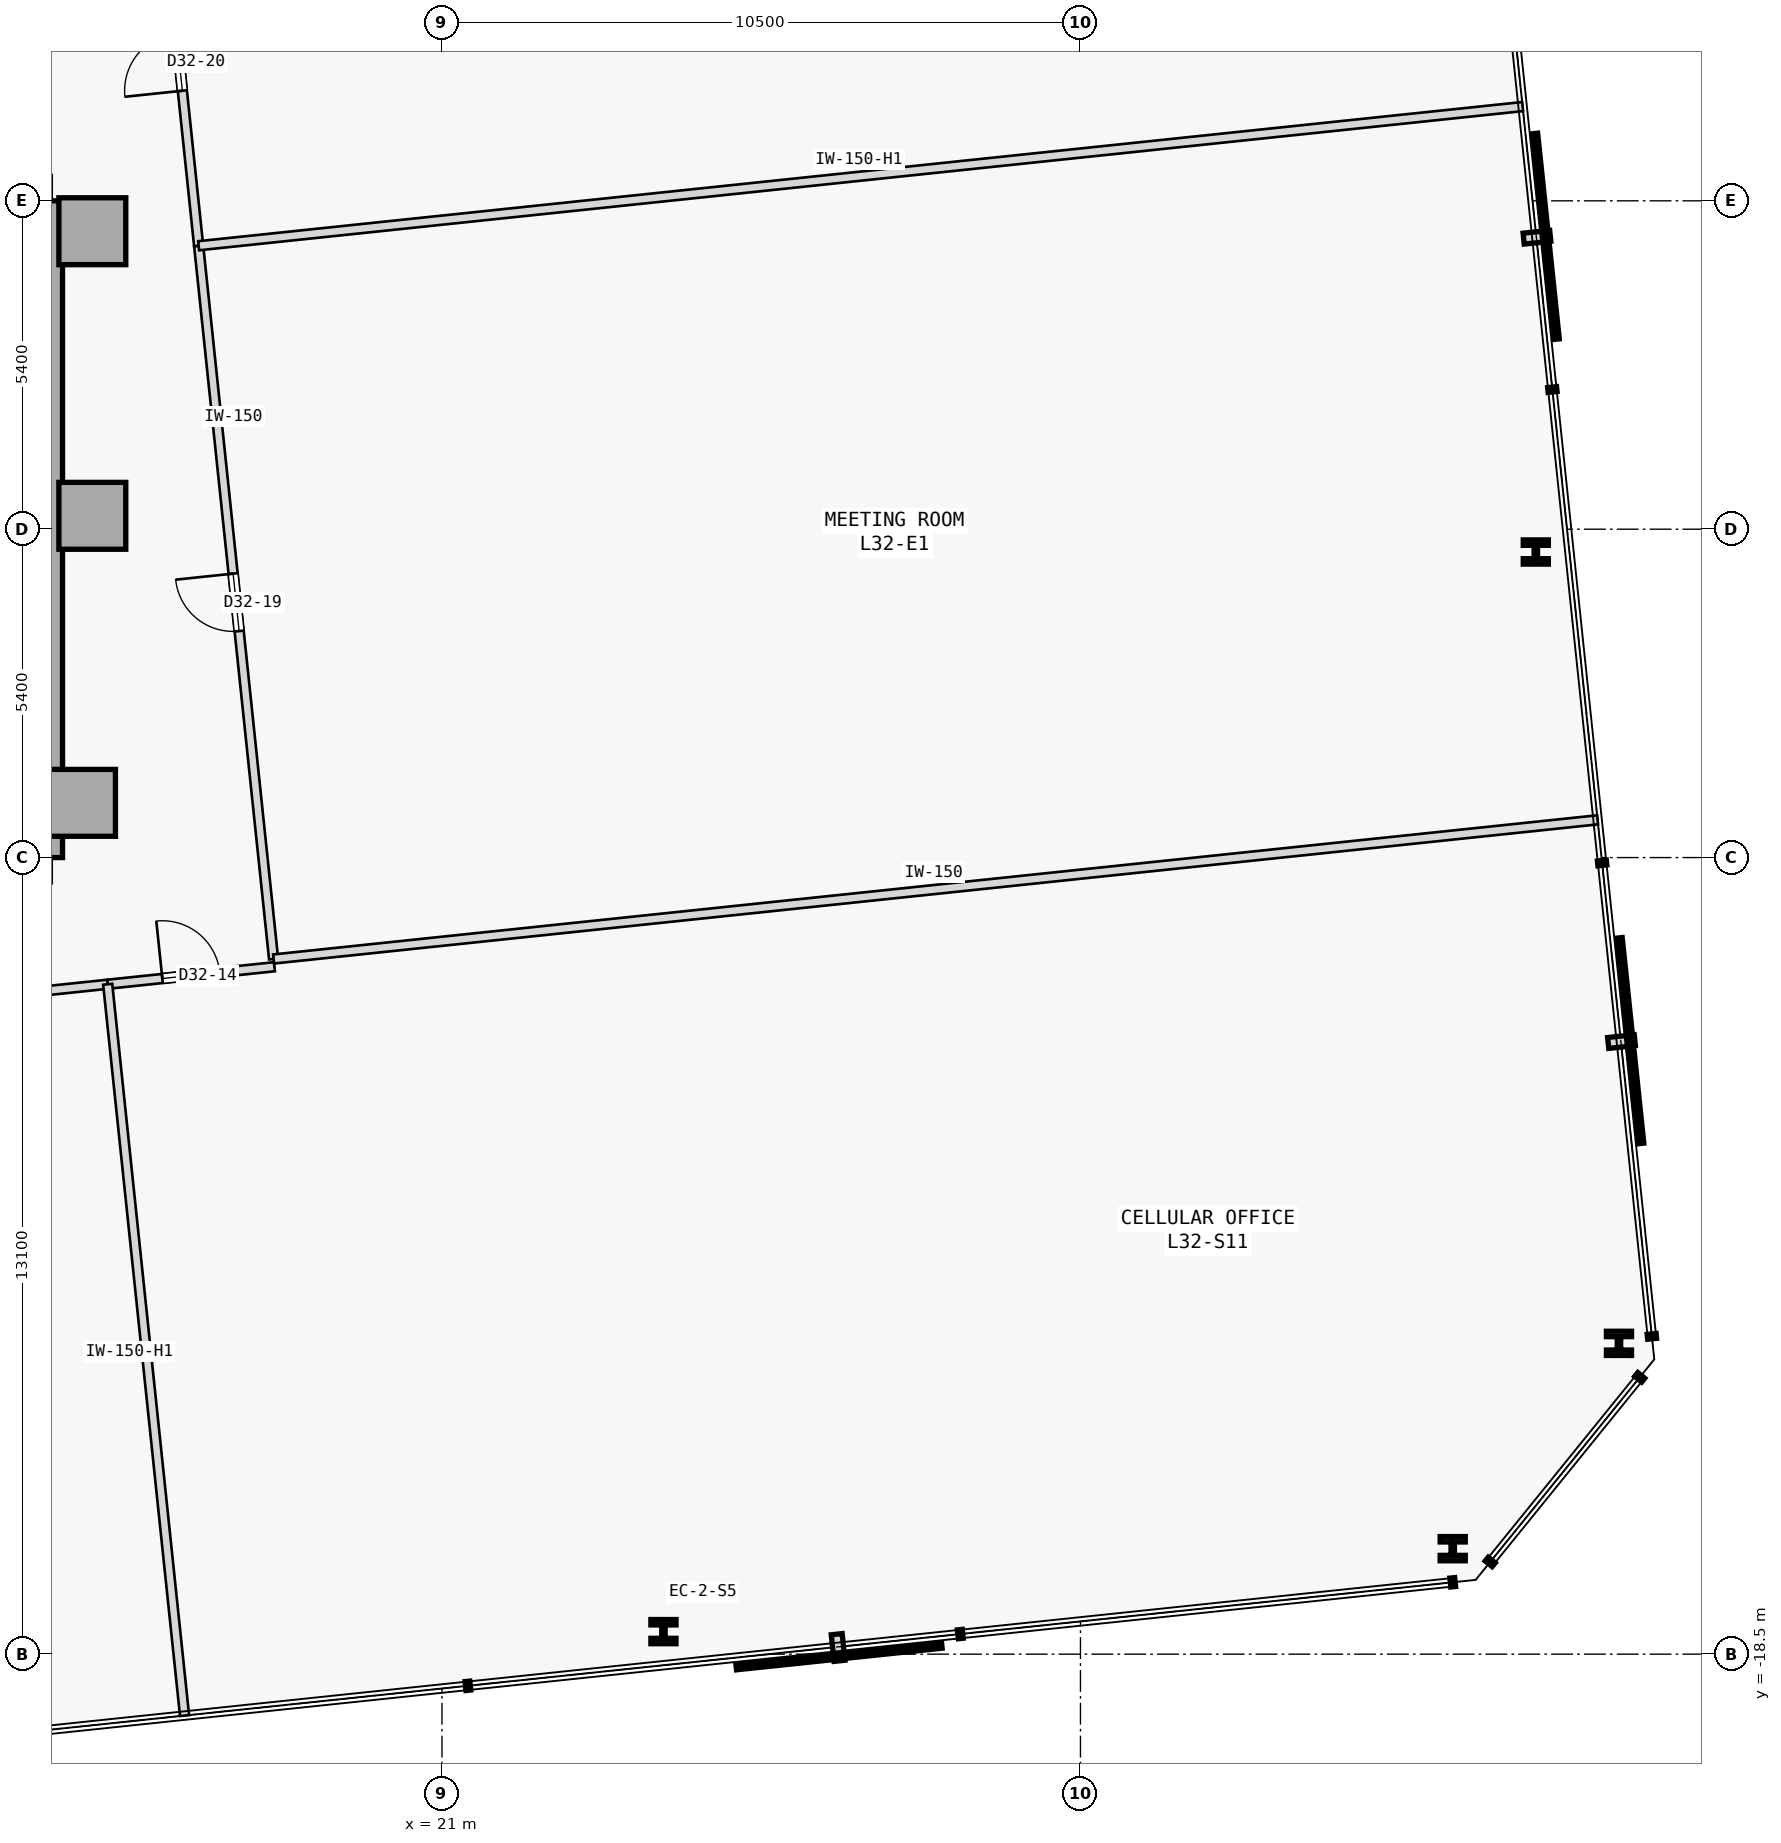
"""IFC4 building model, lengths in metres.
Left out: names, types, materials, properties, quantities, classifications, styles, units other than length and angle.
Written with IfcOpenShell. Run it as: python <this file> out.ifc"""

import sys

from ifc_helpers import new_model, si_unit, direction, frame, frame_2d, origin, origin_2d, place, context, subcontext, project, spatial, rectangle, i_section, extrude, element, fill, save


model = new_model("IFC4")
c1 = context("Model", 3, precision=1e-05, world=origin(), true_north=direction((0.0, 1.0)))
c2 = subcontext(c1, "Body", "Model", "MODEL_VIEW")
j1 = project(units=[si_unit("LENGTHUNIT", "METRE"), si_unit("PLANEANGLEUNIT", "RADIAN")], contexts=[c1])
p1 = place(None, origin())
s1 = spatial("IfcSite", under=j1, at=p1, CompositionType="ELEMENT")
p2 = place(p1, origin())
s2 = spatial("IfcBuilding", under=s1, at=p2, CompositionType="ELEMENT")
p3 = place(p2, frame((0.0, 0.0, 128.1)))
s3 = spatial("IfcBuildingStorey", under=s2, at=p3, CompositionType="ELEMENT", Elevation=128.1)
for number, where, z_axis, x_axis in (
    (1, (15.25, 4.9, 0.0), (0.0, 0.0, 1.0), (1.0, 0.0, 0.0)),
    (2, (15.25, 0.22, 0.0), (0.0, 0.0, 1.0), (1.0, 0.0, 0.0)),
    (3, (15.08, -4.5, 0.0), (0.0, 0.0, 1.0), (1.0, 0.0, 0.0)),
):
    element("IfcColumn", number, at=place(p3, frame(where, z_axis=z_axis, x_axis=x_axis)), inside=s3, PredefinedType="COLUMN", context=c2, shape_type="SweptSolid", body=[
        extrude(rectangle(XDim=1.1, YDim=1.1, at=origin_2d()), origin(), (0.0, 0.0, 1.0), 3.7),
    ])
p4 = place(p3, frame((14.56, -5.4, 0.0), z_axis=(0.0, 0.0, 1.0), x_axis=(0.0, 1.0, 0.0)))
e4 = element("IfcWall", 4, at=p4, inside=s3, PredefinedType="SHEAR", context=c2, shape_type="SweptSolid", body=[
    extrude(rectangle(XDim=10.8, YDim=0.4, at=frame_2d((5.4, 0.0))), origin(), (0.0, 0.0, 1.0), 3.475),
])
for number, where, z_axis, x_axis in (
    (5, (24.642, -18.129, 0.0), (0.0, 0.0, 1.0), (1.0, 0.0, 0.0)),
    (6, (37.622, -16.765, 0.0), (0.0, 0.0, 1.0), (1.0, 0.0, 0.0)),
    (7, (40.356, -13.389, 0.0), (0.0, 0.0, 1.0), (1.0, 0.0, 0.0)),
    (8, (38.988, -0.375, 0.0), (0.0, 0.0, 1.0), (1.0, 0.0, 0.0)),
):
    element("IfcColumn", number, at=place(p3, frame(where, z_axis=z_axis, x_axis=x_axis)), inside=s3, PredefinedType="COLUMN", context=c2, shape_type="SweptSolid", body=[
        extrude(i_section(OverallWidth=0.413, OverallDepth=0.398, WebThickness=0.056, FlangeThickness=0.089, FilletRadius=0.015, at=origin_2d()), origin(), (0.0, 0.0, 1.0), 3.7),
    ])
p5 = place(p3, frame((-16.14, -10.809, 0.0), z_axis=(0.0, 0.0, 1.0), x_axis=(0.994522174335, 0.104525809046, 0.0)))
e9 = element("IfcWall", 9, at=p5, inside=s3, PredefinedType="PARTITIONING", context=c2, shape_type="SweptSolid", body=[
    extrude(rectangle(XDim=31.817, YDim=0.15, at=frame_2d((15.908, 0.0))), origin(), (0.0, 0.0, 1.0), 3.475),
])
p6 = place(p5, frame((15.434, 0.0, 0.0)))
e10 = element("IfcOpeningElement", 10, at=p6, cuts=e9, PredefinedType="OPENING", context=c2, shape_type="SweptSolid", body=[
    extrude(rectangle(XDim=0.95, YDim=2.15, at=frame_2d((0.475, 1.075))), frame((0.0, 0.085, 0.0), z_axis=(0.0, -1.0, 0.0), x_axis=(1.0, 0.0, 0.0)), (0.0, 0.0, 1.0), 0.17),
])
p7 = place(p3, frame((15.503, -7.483, 0.0), z_axis=(0.0, 0.0, 1.0), x_axis=(0.994525813133, 0.104491181506, 0.0)))
e11 = element("IfcWall", 11, at=p7, inside=s3, PredefinedType="PARTITIONING", context=c2, shape_type="SweptSolid", body=[
    extrude(rectangle(XDim=2.757, YDim=0.15, at=frame_2d((1.378, 0.0))), origin(), (0.0, 0.0, 1.0), 3.475),
])
p8 = place(p7, frame((0.904, 0.0, 0.0)))
e12 = element("IfcOpeningElement", 12, at=p8, cuts=e11, PredefinedType="OPENING", context=c2, shape_type="SweptSolid", body=[
    extrude(rectangle(XDim=0.95, YDim=2.15, at=frame_2d((0.475, 1.075))), frame((0.0, 0.085, 0.0), z_axis=(0.0, -1.0, 0.0), x_axis=(1.0, 0.0, 0.0)), (0.0, 0.0, 1.0), 0.17),
])
p9 = place(p3, frame((18.231, -7.068, 0.0), z_axis=(0.0, 0.0, 1.0), x_axis=(-0.104536082083, 0.994521094569, 0.0)))
e13 = element("IfcWall", 13, at=p9, inside=s3, PredefinedType="PARTITIONING", context=c2, shape_type="SweptSolid", body=[
    extrude(rectangle(XDim=11.794, YDim=0.15, at=frame_2d((5.897, 0.0))), origin(), (0.0, 0.0, 1.0), 3.475),
])
p10 = place(p9, frame((5.422, 0.0, 0.0)))
e14 = element("IfcOpeningElement", 14, at=p10, cuts=e13, PredefinedType="OPENING", context=c2, shape_type="SweptSolid", body=[
    extrude(rectangle(XDim=0.95, YDim=2.15, at=frame_2d((0.475, 1.075))), frame((0.0, 0.085, 0.0), z_axis=(0.0, -1.0, 0.0), x_axis=(1.0, 0.0, 0.0)), (0.0, 0.0, 1.0), 0.17),
])
p11 = place(p3, frame((16.998, 4.662, 0.0), z_axis=(0.0, 0.0, 1.0), x_axis=(-0.104515354875, 0.994523273029, 0.0)))
e15 = element("IfcWall", 15, at=p11, inside=s3, PredefinedType="PARTITIONING", context=c2, shape_type="SweptSolid", body=[
    extrude(rectangle(XDim=6.076, YDim=0.15, at=frame_2d((3.038, 0.0))), origin(), (0.0, 0.0, 1.0), 3.475),
])
p12 = place(p11, frame((2.563, 0.0, 0.0)))
e16 = element("IfcOpeningElement", 16, at=p12, cuts=e15, PredefinedType="OPENING", context=c2, shape_type="SweptSolid", body=[
    extrude(rectangle(XDim=0.95, YDim=2.15, at=frame_2d((0.475, 1.075))), frame((0.0, 0.085, 0.0), z_axis=(0.0, -1.0, 0.0), x_axis=(1.0, 0.0, 0.0)), (0.0, 0.0, 1.0), 0.17),
])
p13 = place(p3, frame((16.767, -19.51, 0.0), z_axis=(0.0, 0.0, 1.0), x_axis=(-0.104517685722, 0.994523028075, 0.0)))
e17 = element("IfcWall", 17, at=p13, inside=s3, PredefinedType="PARTITIONING", context=c2, shape_type="SweptSolid", body=[
    extrude(rectangle(XDim=12.093, YDim=0.15, at=frame_2d((6.046, 0.0))), origin(), (0.0, 0.0, 1.0), 3.025),
])
p14 = place(p3, frame((18.231, -7.068, 0.0), z_axis=(0.0, 0.0, 1.0), x_axis=(0.994521328491, 0.104533856601, 0.0)))
e18 = element("IfcWall", 18, at=p14, inside=s3, PredefinedType="PARTITIONING", context=c2, shape_type="SweptSolid", body=[
    extrude(rectangle(XDim=21.893, YDim=0.15, at=frame_2d((10.947, 0.0))), origin(), (0.0, 0.0, 1.0), 3.475),
])
p15 = place(p3, frame((16.998, 4.662, 0.0), z_axis=(0.0, 0.0, 1.0), x_axis=(0.994522487751, 0.10452282697, 0.0)))
e19 = element("IfcWall", 19, at=p15, inside=s3, PredefinedType="PARTITIONING", context=c2, shape_type="SweptSolid", body=[
    extrude(rectangle(XDim=21.893, YDim=0.15, at=frame_2d((10.947, 0.0))), origin(), (0.0, 0.0, 1.0), 3.025),
])
p16 = place(p8, origin())
e20 = element("IfcDoor", 20, at=p16, inside=s3, OperationType="SINGLE_SWING_LEFT", PredefinedType="DOOR", context=c2, shape_type="SweptSolid", body=[
    extrude(rectangle(XDim=0.95, YDim=2.15, at=frame_2d((0.475, 1.075))), frame((0.0, 0.025, 0.0), z_axis=(0.0, -1.0, 0.0), x_axis=(1.0, 0.0, 0.0)), (0.0, 0.0, 1.0), 0.05),
])
fill(e12, e20)
p17 = place(p10, origin())
e21 = element("IfcDoor", 21, at=p17, inside=s3, OperationType="SINGLE_SWING_RIGHT", PredefinedType="DOOR", context=c2, shape_type="SweptSolid", body=[
    extrude(rectangle(XDim=0.95, YDim=2.15, at=frame_2d((0.475, 1.075))), frame((0.0, 0.025, 0.0), z_axis=(0.0, -1.0, 0.0), x_axis=(1.0, 0.0, 0.0)), (0.0, 0.0, 1.0), 0.05),
])
fill(e14, e21)
p18 = place(p12, origin())
e22 = element("IfcDoor", 22, at=p18, inside=s3, OperationType="SINGLE_SWING_LEFT", PredefinedType="DOOR", context=c2, shape_type="SweptSolid", body=[
    extrude(rectangle(XDim=0.95, YDim=2.15, at=frame_2d((0.475, 1.075))), frame((0.0, 0.025, 0.0), z_axis=(0.0, -1.0, 0.0), x_axis=(1.0, 0.0, 0.0)), (0.0, 0.0, 1.0), 0.05),
])
fill(e16, e22)
save(model, sys.argv[1])
